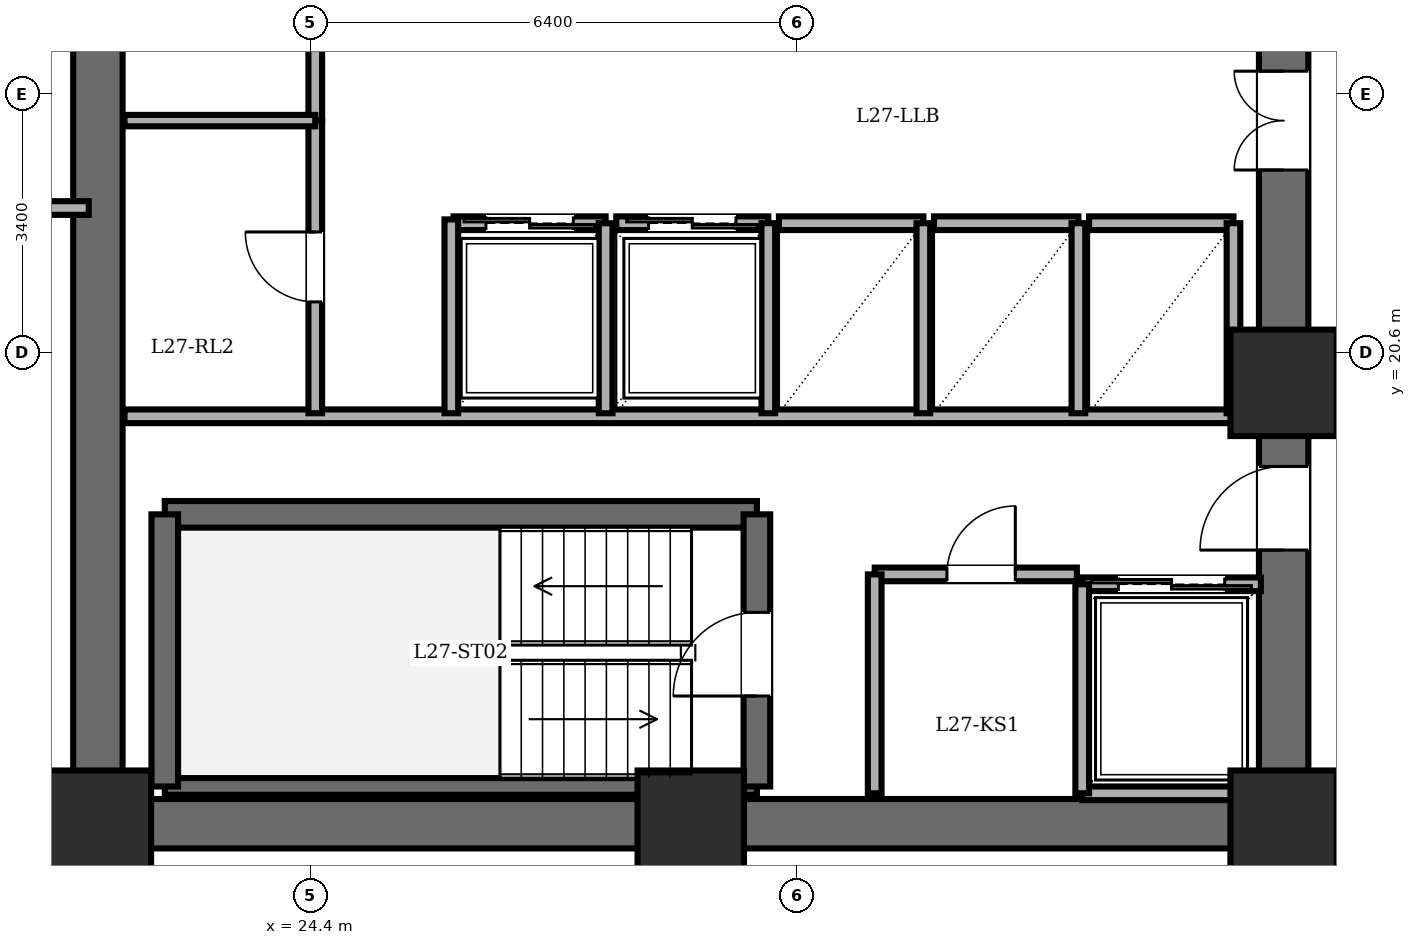
"""IFC4 building model, lengths in metres.
Left out: names, types, materials, properties, quantities, classifications, styles, units other than length and angle.
Written with IfcOpenShell. Run it as: python <this file> out.ifc"""

import sys

from ifc_helpers import new_model, si_unit, direction, frame, frame_2d, origin, origin_2d, place, context, subcontext, project, spatial, rectangle, extrude, element, fill, save


model = new_model("IFC4")
c1 = context("Model", 3, precision=1e-05, world=origin(), true_north=direction((0.0, 1.0)))
c2 = subcontext(c1, "Body", "Model", "MODEL_VIEW")
j1 = project(units=[si_unit("LENGTHUNIT", "METRE"), si_unit("PLANEANGLEUNIT", "RADIAN")], contexts=[c1])
p1 = place(None, origin())
s1 = spatial("IfcSite", under=j1, at=p1, CompositionType="ELEMENT")
p2 = place(p1, origin())
s2 = spatial("IfcBuilding", under=s1, at=p2, CompositionType="ELEMENT")
p3 = place(p2, frame((0.0, 0.0, 104.3)))
s3 = spatial("IfcBuildingStorey", under=s2, at=p3, CompositionType="ELEMENT", Elevation=104.3)
for number, where, z_axis, x_axis in (
    (1, (21.6, 14.4, 0.0), (0.0, 0.0, 1.0), (1.0, 0.0, 0.0)),
    (2, (29.4, 14.4, 0.0), (0.0, 0.0, 1.0), (1.0, 0.0, 0.0)),
    (3, (37.2, 14.4, 0.0), (0.0, 0.0, 1.0), (1.0, 0.0, 0.0)),
    (4, (37.2, 20.2, 0.0), (0.0, 0.0, 1.0), (1.0, 0.0, 0.0)),
):
    element("IfcColumn", number, at=place(p3, frame(where, z_axis=z_axis, x_axis=x_axis)), inside=s3, PredefinedType="COLUMN", context=c2, shape_type="SweptSolid", body=[
        extrude(rectangle(XDim=1.4, YDim=1.4, at=origin_2d()), origin(), (0.0, 0.0, 1.0), 3.6),
    ])
p4 = place(p3, frame((21.6, 14.4, 0.0), z_axis=(0.0, 0.0, 1.0), x_axis=(0.0, 1.0, 0.0)))
e5 = element("IfcWall", 5, at=p4, inside=s3, PredefinedType="SHEAR", context=c2, shape_type="SweptSolid", body=[
    extrude(rectangle(XDim=19.2, YDim=0.65, at=frame_2d((9.6, 0.0))), origin(), (0.0, 0.0, 1.0), 3.4),
])
p5 = place(p3, frame((37.2, 14.4, 0.0), z_axis=(0.0, 0.0, 1.0), x_axis=(-1.0, 0.0, 0.0)))
e6 = element("IfcWall", 6, at=p5, inside=s3, PredefinedType="SHEAR", context=c2, shape_type="SweptSolid", body=[
    extrude(rectangle(XDim=15.6, YDim=0.65, at=frame_2d((7.8, 0.0))), origin(), (0.0, 0.0, 1.0), 3.4),
])
p6 = place(p3, frame((37.2, 14.4, 0.0), z_axis=(0.0, 0.0, 1.0), x_axis=(0.0, 1.0, 0.0)))
e7 = element("IfcWall", 7, at=p6, inside=s3, PredefinedType="SHEAR", context=c2, shape_type="SweptSolid", body=[
    extrude(rectangle(XDim=19.2, YDim=0.65, at=frame_2d((9.6, 0.0))), origin(), (0.0, 0.0, 1.0), 3.4),
])
p7 = place(p6, frame((15.8, 0.0, 0.0)))
e8 = element("IfcOpeningElement", 8, at=p7, cuts=e7, PredefinedType="OPENING", context=c2, shape_type="SweptSolid", body=[
    extrude(rectangle(XDim=1.15, YDim=2.15, at=frame_2d((0.575, 1.075))), frame((0.0, 0.335, 0.0), z_axis=(0.0, -1.0, 0.0), x_axis=(1.0, 0.0, 0.0)), (0.0, 0.0, 1.0), 0.67),
])
p8 = place(p6, frame((3.6, 0.0, 0.0)))
e9 = element("IfcOpeningElement", 9, at=p8, cuts=e7, PredefinedType="OPENING", context=c2, shape_type="SweptSolid", body=[
    extrude(rectangle(XDim=1.1, YDim=2.15, at=frame_2d((0.55, 1.075))), frame((0.0, 0.335, 0.0), z_axis=(0.0, -1.0, 0.0), x_axis=(1.0, 0.0, 0.0)), (0.0, 0.0, 1.0), 0.67),
])
p9 = place(p6, frame((8.6, 0.0, 0.0)))
e10 = element("IfcOpeningElement", 10, at=p9, cuts=e7, PredefinedType="OPENING", context=c2, shape_type="SweptSolid", body=[
    extrude(rectangle(XDim=1.3, YDim=2.2, at=frame_2d((0.65, 1.1))), frame((0.0, 0.335, 0.0), z_axis=(0.0, -1.0, 0.0), x_axis=(1.0, 0.0, 0.0)), (0.0, 0.0, 1.0), 0.67),
])
p10 = place(p3, frame((22.48, 18.47, 0.0), z_axis=(0.0, 0.0, 1.0), x_axis=(1.0, 0.0, 0.0)))
e11 = element("IfcWall", 11, at=p10, inside=s3, PredefinedType="SOLIDWALL", context=c2, shape_type="SweptSolid", body=[
    extrude(rectangle(XDim=7.79, YDim=0.35, at=frame_2d((3.895, 0.0))), origin(), (0.0, 0.0, 1.0), 3.4),
])
p11 = place(p3, frame((22.48, 14.89, 0.0), z_axis=(0.0, 0.0, 1.0), x_axis=(1.0, 0.0, 0.0)))
e12 = element("IfcWall", 12, at=p11, inside=s3, PredefinedType="PARTITIONING", context=c2, shape_type="SweptSolid", body=[
    extrude(rectangle(XDim=7.79, YDim=0.22, at=frame_2d((3.895, 0.0))), origin(), (0.0, 0.0, 1.0), 3.4),
])
p12 = place(p3, frame((22.48, 14.89, 0.0), z_axis=(0.0, 0.0, 1.0), x_axis=(0.0, 1.0, 0.0)))
e13 = element("IfcWall", 13, at=p12, inside=s3, PredefinedType="SOLIDWALL", context=c2, shape_type="SweptSolid", body=[
    extrude(rectangle(XDim=3.58, YDim=0.35, at=frame_2d((1.79, 0.0))), origin(), (0.0, 0.0, 1.0), 3.4),
])
p13 = place(p3, frame((30.27, 14.89, 0.0), z_axis=(0.0, 0.0, 1.0), x_axis=(0.0, 1.0, 0.0)))
e14 = element("IfcWall", 14, at=p13, inside=s3, PredefinedType="SOLIDWALL", context=c2, shape_type="SweptSolid", body=[
    extrude(rectangle(XDim=3.58, YDim=0.35, at=frame_2d((1.79, 0.0))), origin(), (0.0, 0.0, 1.0), 3.4),
])
p14 = place(p13, frame((1.19, 0.0, 0.0)))
e15 = element("IfcOpeningElement", 15, at=p14, cuts=e14, PredefinedType="OPENING", context=c2, shape_type="SweptSolid", body=[
    extrude(rectangle(XDim=1.1, YDim=2.15, at=frame_2d((0.55, 1.075))), frame((0.0, 0.185, 0.0), z_axis=(0.0, -1.0, 0.0), x_axis=(1.0, 0.0, 0.0)), (0.0, 0.0, 1.0), 0.37),
])
p15 = place(p3, frame((21.95, 19.76, 0.0), z_axis=(0.0, 0.0, 1.0), x_axis=(1.0, 0.0, 0.0)))
e16 = element("IfcWall", 16, at=p15, inside=s3, PredefinedType="PARTITIONING", context=c2, shape_type="SweptSolid", body=[
    extrude(rectangle(XDim=14.87, YDim=0.18, at=frame_2d((7.435, 0.0))), origin(), (0.0, 0.0, 1.0), 3.4),
])
p16 = place(p3, frame((31.82, 17.68, 0.0), z_axis=(0.0, 0.0, 1.0), x_axis=(1.0, 0.0, 0.0)))
e17 = element("IfcWall", 17, at=p16, inside=s3, PredefinedType="PARTITIONING", context=c2, shape_type="SweptSolid", body=[
    extrude(rectangle(XDim=2.66, YDim=0.18, at=frame_2d((1.33, 0.0))), origin(), (0.0, 0.0, 1.0), 3.4),
])
p17 = place(p16, frame((0.95, 0.0, 0.0)))
e18 = element("IfcOpeningElement", 18, at=p17, cuts=e17, PredefinedType="OPENING", context=c2, shape_type="SweptSolid", body=[
    extrude(rectangle(XDim=0.9, YDim=2.05, at=frame_2d((0.45, 1.025))), frame((0.0, 0.1, 0.0), z_axis=(0.0, -1.0, 0.0), x_axis=(1.0, 0.0, 0.0)), (0.0, 0.0, 1.0), 0.2),
])
p18 = place(p3, frame((31.82, 14.8, 0.0), z_axis=(0.0, 0.0, 1.0), x_axis=(0.0, 1.0, 0.0)))
e19 = element("IfcWall", 19, at=p18, inside=s3, PredefinedType="PARTITIONING", context=c2, shape_type="SweptSolid", body=[
    extrude(rectangle(XDim=2.88, YDim=0.18, at=frame_2d((1.44, 0.0))), origin(), (0.0, 0.0, 1.0), 3.4),
])
p19 = place(p3, frame((34.55, 17.55, 0.0), z_axis=(0.0, 0.0, 1.0), x_axis=(1.0, 0.0, 0.0)))
e20 = element("IfcWall", 20, at=p19, inside=s3, PredefinedType="PARTITIONING", context=c2, shape_type="SweptSolid", body=[
    extrude(rectangle(XDim=2.35, YDim=0.18, at=frame_2d((1.175, 0.0))), origin(), (0.0, 0.0, 1.0), 3.4),
])
p20 = place(p19, frame((0.475, 0.0, 0.0)))
e21 = element("IfcOpeningElement", 21, at=p20, cuts=e20, PredefinedType="OPENING", context=c2, shape_type="SweptSolid", body=[
    extrude(rectangle(XDim=1.4, YDim=2.3, at=frame_2d((0.7, 1.15))), frame((0.0, 0.1, 0.0), z_axis=(0.0, -1.0, 0.0), x_axis=(1.0, 0.0, 0.0)), (0.0, 0.0, 1.0), 0.2),
])
p21 = place(p3, frame((36.9, 14.8, 0.0), z_axis=(0.0, 0.0, 1.0), x_axis=(-1.0, 0.0, 0.0)))
e22 = element("IfcWall", 22, at=p21, inside=s3, PredefinedType="PARTITIONING", context=c2, shape_type="SweptSolid", body=[
    extrude(rectangle(XDim=2.35, YDim=0.18, at=frame_2d((1.175, 0.0))), origin(), (0.0, 0.0, 1.0), 3.4),
])
p22 = place(p3, frame((34.55, 17.55, 0.0), z_axis=(0.0, 0.0, 1.0), x_axis=(0.0, -1.0, 0.0)))
e23 = element("IfcWall", 23, at=p22, inside=s3, PredefinedType="PARTITIONING", context=c2, shape_type="SweptSolid", body=[
    extrude(rectangle(XDim=2.75, YDim=0.18, at=frame_2d((1.375, 0.0))), origin(), (0.0, 0.0, 1.0), 3.4),
])
p23 = place(p3, frame((26.28, 22.3, 0.0), z_axis=(0.0, 0.0, 1.0), x_axis=(1.0, 0.0, 0.0)))
e24 = element("IfcWall", 24, at=p23, inside=s3, PredefinedType="PARTITIONING", context=c2, shape_type="SweptSolid", body=[
    extrude(rectangle(XDim=2.0, YDim=0.18, at=frame_2d((1.0, 0.0))), origin(), (0.0, 0.0, 1.0), 3.4),
])
p24 = place(p23, frame((0.425, 0.0, 0.0)))
e25 = element("IfcOpeningElement", 25, at=p24, cuts=e24, PredefinedType="OPENING", context=c2, shape_type="SweptSolid", body=[
    extrude(rectangle(XDim=1.15, YDim=2.2, at=frame_2d((0.575, 1.1))), frame((0.0, 0.1, 0.0), z_axis=(0.0, -1.0, 0.0), x_axis=(1.0, 0.0, 0.0)), (0.0, 0.0, 1.0), 0.2),
])
p25 = place(p3, frame((28.28, 19.8, 0.0), z_axis=(0.0, 0.0, 1.0), x_axis=(0.0, 1.0, 0.0)))
e26 = element("IfcWall", 26, at=p25, inside=s3, PredefinedType="PARTITIONING", context=c2, shape_type="SweptSolid", body=[
    extrude(rectangle(XDim=2.5, YDim=0.18, at=frame_2d((1.25, 0.0))), origin(), (0.0, 0.0, 1.0), 3.4),
])
p26 = place(p3, frame((28.42, 22.3, 0.0), z_axis=(0.0, 0.0, 1.0), x_axis=(1.0, 0.0, 0.0)))
e27 = element("IfcWall", 27, at=p26, inside=s3, PredefinedType="PARTITIONING", context=c2, shape_type="SweptSolid", body=[
    extrude(rectangle(XDim=2.0, YDim=0.18, at=frame_2d((1.0, 0.0))), origin(), (0.0, 0.0, 1.0), 3.4),
])
p27 = place(p26, frame((0.425, 0.0, 0.0)))
e28 = element("IfcOpeningElement", 28, at=p27, cuts=e27, PredefinedType="OPENING", context=c2, shape_type="SweptSolid", body=[
    extrude(rectangle(XDim=1.15, YDim=2.2, at=frame_2d((0.575, 1.1))), frame((0.0, 0.1, 0.0), z_axis=(0.0, -1.0, 0.0), x_axis=(1.0, 0.0, 0.0)), (0.0, 0.0, 1.0), 0.2),
])
p28 = place(p3, frame((30.42, 19.8, 0.0), z_axis=(0.0, 0.0, 1.0), x_axis=(0.0, 1.0, 0.0)))
e29 = element("IfcWall", 29, at=p28, inside=s3, PredefinedType="PARTITIONING", context=c2, shape_type="SweptSolid", body=[
    extrude(rectangle(XDim=2.5, YDim=0.18, at=frame_2d((1.25, 0.0))), origin(), (0.0, 0.0, 1.0), 3.4),
])
p29 = place(p3, frame((30.56, 22.3, 0.0), z_axis=(0.0, 0.0, 1.0), x_axis=(1.0, 0.0, 0.0)))
e30 = element("IfcWall", 30, at=p29, inside=s3, PredefinedType="PARTITIONING", context=c2, shape_type="SweptSolid", body=[
    extrude(rectangle(XDim=1.9, YDim=0.18, at=frame_2d((0.95, 0.0))), origin(), (0.0, 0.0, 1.0), 3.4),
])
p30 = place(p3, frame((32.46, 19.8, 0.0), z_axis=(0.0, 0.0, 1.0), x_axis=(0.0, 1.0, 0.0)))
e31 = element("IfcWall", 31, at=p30, inside=s3, PredefinedType="PARTITIONING", context=c2, shape_type="SweptSolid", body=[
    extrude(rectangle(XDim=2.5, YDim=0.18, at=frame_2d((1.25, 0.0))), origin(), (0.0, 0.0, 1.0), 3.4),
])
p31 = place(p3, frame((32.6, 22.3, 0.0), z_axis=(0.0, 0.0, 1.0), x_axis=(1.0, 0.0, 0.0)))
e32 = element("IfcWall", 32, at=p31, inside=s3, PredefinedType="PARTITIONING", context=c2, shape_type="SweptSolid", body=[
    extrude(rectangle(XDim=1.9, YDim=0.18, at=frame_2d((0.95, 0.0))), origin(), (0.0, 0.0, 1.0), 3.4),
])
p32 = place(p3, frame((34.5, 19.8, 0.0), z_axis=(0.0, 0.0, 1.0), x_axis=(0.0, 1.0, 0.0)))
e33 = element("IfcWall", 33, at=p32, inside=s3, PredefinedType="PARTITIONING", context=c2, shape_type="SweptSolid", body=[
    extrude(rectangle(XDim=2.5, YDim=0.18, at=frame_2d((1.25, 0.0))), origin(), (0.0, 0.0, 1.0), 3.4),
])
p33 = place(p3, frame((34.64, 22.3, 0.0), z_axis=(0.0, 0.0, 1.0), x_axis=(1.0, 0.0, 0.0)))
e34 = element("IfcWall", 34, at=p33, inside=s3, PredefinedType="PARTITIONING", context=c2, shape_type="SweptSolid", body=[
    extrude(rectangle(XDim=1.9, YDim=0.18, at=frame_2d((0.95, 0.0))), origin(), (0.0, 0.0, 1.0), 3.4),
])
p34 = place(p3, frame((36.54, 19.8, 0.0), z_axis=(0.0, 0.0, 1.0), x_axis=(0.0, 1.0, 0.0)))
e35 = element("IfcWall", 35, at=p34, inside=s3, PredefinedType="PARTITIONING", context=c2, shape_type="SweptSolid", body=[
    extrude(rectangle(XDim=2.5, YDim=0.18, at=frame_2d((1.25, 0.0))), origin(), (0.0, 0.0, 1.0), 3.4),
])
p35 = place(p3, frame((24.46, 23.65, 0.0), z_axis=(0.0, 0.0, 1.0), x_axis=(0.0, 1.0, 0.0)))
e36 = element("IfcWall", 36, at=p35, inside=s3, PredefinedType="PARTITIONING", context=c2, shape_type="SweptSolid", body=[
    extrude(rectangle(XDim=3.85, YDim=0.18, at=frame_2d((1.925, 0.0))), origin(), (0.0, 0.0, 1.0), 3.4),
])
p36 = place(p35, frame((1.465, 0.0, 0.0)))
e37 = element("IfcOpeningElement", 37, at=p36, cuts=e36, PredefinedType="OPENING", context=c2, shape_type="SweptSolid", body=[
    extrude(rectangle(XDim=0.92, YDim=2.1, at=frame_2d((0.46, 1.05))), frame((0.0, 0.1, 0.0), z_axis=(0.0, -1.0, 0.0), x_axis=(1.0, 0.0, 0.0)), (0.0, 0.0, 1.0), 0.2),
])
p37 = place(p3, frame((24.46, 19.8, 0.0), z_axis=(0.0, 0.0, 1.0), x_axis=(0.0, 1.0, 0.0)))
e38 = element("IfcWall", 38, at=p37, inside=s3, PredefinedType="PARTITIONING", context=c2, shape_type="SweptSolid", body=[
    extrude(rectangle(XDim=3.85, YDim=0.18, at=frame_2d((1.925, 0.0))), origin(), (0.0, 0.0, 1.0), 3.4),
])
p38 = place(p37, frame((1.465, 0.0, 0.0)))
e39 = element("IfcOpeningElement", 39, at=p38, cuts=e38, PredefinedType="OPENING", context=c2, shape_type="SweptSolid", body=[
    extrude(rectangle(XDim=0.92, YDim=2.1, at=frame_2d((0.46, 1.05))), frame((0.0, 0.1, 0.0), z_axis=(0.0, -1.0, 0.0), x_axis=(1.0, 0.0, 0.0)), (0.0, 0.0, 1.0), 0.2),
])
p39 = place(p3, frame((21.95, 23.65, 0.0), z_axis=(0.0, 0.0, 1.0), x_axis=(1.0, 0.0, 0.0)))
e40 = element("IfcWall", 40, at=p39, inside=s3, PredefinedType="PARTITIONING", context=c2, shape_type="SweptSolid", body=[
    extrude(rectangle(XDim=2.51, YDim=0.15, at=frame_2d((1.255, 0.0))), origin(), (0.0, 0.0, 1.0), 3.4),
])
p40 = place(p3, frame((26.25, 19.8, 0.0), z_axis=(0.0, 0.0, 1.0), x_axis=(0.0, 1.0, 0.0)))
e41 = element("IfcWall", 41, at=p40, inside=s3, PredefinedType="PARTITIONING", context=c2, shape_type="SweptSolid", body=[
    extrude(rectangle(XDim=2.55, YDim=0.18, at=frame_2d((1.275, 0.0))), origin(), (0.0, 0.0, 1.0), 3.4),
])
p41 = place(p3, frame((8.8, 14.18, 0.0), z_axis=(0.0, 0.0, 1.0), x_axis=(1.0, 0.0, 0.0)))
e42 = element("IfcWall", 42, at=p41, inside=s3, PredefinedType="PARTITIONING", context=c2, shape_type="SweptSolid", body=[
    extrude(rectangle(XDim=12.68, YDim=0.18, at=frame_2d((6.34, 0.0))), origin(), (0.0, 0.0, 1.0), 3.4),
])
p42 = place(p41, frame((6.18, 0.0, 0.0)))
e43 = element("IfcOpeningElement", 43, at=p42, cuts=e42, PredefinedType="OPENING", context=c2, shape_type="SweptSolid", body=[
    extrude(rectangle(XDim=1.0, YDim=2.15, at=frame_2d((0.5, 1.075))), frame((0.0, 0.1, 0.0), z_axis=(0.0, -1.0, 0.0), x_axis=(1.0, 0.0, 0.0)), (0.0, 0.0, 1.0), 0.2),
])
p43 = place(p3, frame((8.8, 22.5, 0.0), z_axis=(0.0, 0.0, 1.0), x_axis=(1.0, 0.0, 0.0)))
e44 = element("IfcWall", 44, at=p43, inside=s3, PredefinedType="PARTITIONING", context=c2, shape_type="SweptSolid", body=[
    extrude(rectangle(XDim=12.68, YDim=0.18, at=frame_2d((6.34, 0.0))), origin(), (0.0, 0.0, 1.0), 3.4),
])
p44 = place(p14, origin())
e45 = element("IfcDoor", 45, at=p44, inside=s3, OperationType="SINGLE_SWING_LEFT", PredefinedType="DOOR", context=c2, shape_type="SweptSolid", body=[
    extrude(rectangle(XDim=1.1, YDim=2.15, at=frame_2d((0.55, 1.075))), frame((0.0, 0.025, 0.0), z_axis=(0.0, -1.0, 0.0), x_axis=(1.0, 0.0, 0.0)), (0.0, 0.0, 1.0), 0.05),
])
fill(e15, e45)
p45 = place(p8, origin())
e46 = element("IfcDoor", 46, at=p45, inside=s3, OperationType="SINGLE_SWING_LEFT", PredefinedType="DOOR", context=c2, shape_type="SweptSolid", body=[
    extrude(rectangle(XDim=1.1, YDim=2.15, at=frame_2d((0.55, 1.075))), frame((0.0, 0.025, 0.0), z_axis=(0.0, -1.0, 0.0), x_axis=(1.0, 0.0, 0.0)), (0.0, 0.0, 1.0), 0.05),
])
fill(e9, e46)
p46 = place(p17, origin())
e47 = element("IfcDoor", 47, at=p46, inside=s3, OperationType="SINGLE_SWING_RIGHT", PredefinedType="DOOR", context=c2, shape_type="SweptSolid", body=[
    extrude(rectangle(XDim=0.9, YDim=2.05, at=frame_2d((0.45, 1.025))), frame((0.0, 0.025, 0.0), z_axis=(0.0, -1.0, 0.0), x_axis=(1.0, 0.0, 0.0)), (0.0, 0.0, 1.0), 0.05),
])
fill(e18, e47)
p47 = place(p20, origin())
e48 = element("IfcDoor", 48, at=p47, inside=s3, OperationType="DOUBLE_DOOR_SLIDING", PredefinedType="DOOR", context=c2, shape_type="SweptSolid", body=[
    extrude(rectangle(XDim=1.4, YDim=2.3, at=frame_2d((0.7, 1.15))), frame((0.0, 0.025, 0.0), z_axis=(0.0, -1.0, 0.0), x_axis=(1.0, 0.0, 0.0)), (0.0, 0.0, 1.0), 0.05),
])
fill(e21, e48)
p48 = place(p24, origin())
e49 = element("IfcDoor", 49, at=p48, inside=s3, OperationType="DOUBLE_DOOR_SLIDING", PredefinedType="DOOR", context=c2, shape_type="SweptSolid", body=[
    extrude(rectangle(XDim=1.15, YDim=2.2, at=frame_2d((0.575, 1.1))), frame((0.0, 0.025, 0.0), z_axis=(0.0, -1.0, 0.0), x_axis=(1.0, 0.0, 0.0)), (0.0, 0.0, 1.0), 0.05),
])
fill(e25, e49)
p49 = place(p27, origin())
e50 = element("IfcDoor", 50, at=p49, inside=s3, OperationType="DOUBLE_DOOR_SLIDING", PredefinedType="DOOR", context=c2, shape_type="SweptSolid", body=[
    extrude(rectangle(XDim=1.15, YDim=2.2, at=frame_2d((0.575, 1.1))), frame((0.0, 0.025, 0.0), z_axis=(0.0, -1.0, 0.0), x_axis=(1.0, 0.0, 0.0)), (0.0, 0.0, 1.0), 0.05),
])
fill(e28, e50)
p50 = place(p38, origin())
e51 = element("IfcDoor", 51, at=p50, inside=s3, OperationType="SINGLE_SWING_RIGHT", PredefinedType="DOOR", context=c2, shape_type="SweptSolid", body=[
    extrude(rectangle(XDim=0.92, YDim=2.1, at=frame_2d((0.46, 1.05))), frame((0.0, 0.025, 0.0), z_axis=(0.0, -1.0, 0.0), x_axis=(1.0, 0.0, 0.0)), (0.0, 0.0, 1.0), 0.05),
])
fill(e39, e51)
p51 = place(p9, origin())
e52 = element("IfcDoor", 52, at=p51, inside=s3, OperationType="DOUBLE_DOOR_SINGLE_SWING", PredefinedType="DOOR", context=c2, shape_type="SweptSolid", body=[
    extrude(rectangle(XDim=1.3, YDim=2.2, at=frame_2d((0.65, 1.1))), frame((0.0, 0.025, 0.0), z_axis=(0.0, -1.0, 0.0), x_axis=(1.0, 0.0, 0.0)), (0.0, 0.0, 1.0), 0.05),
])
fill(e10, e52)
save(model, sys.argv[1])
